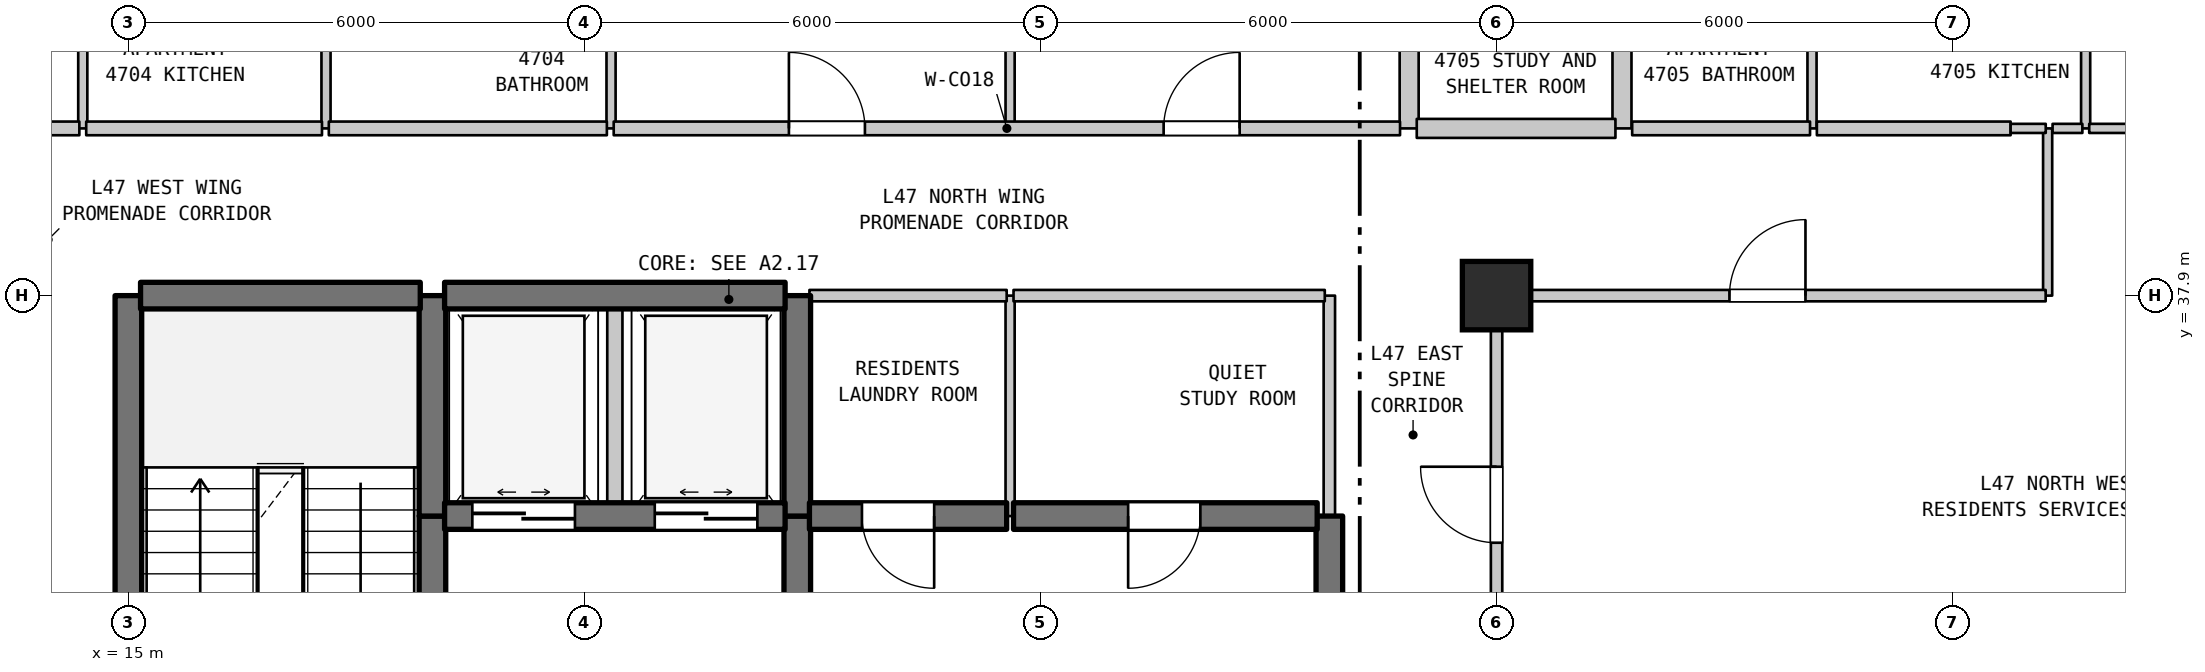
"""IFC4 building model, lengths in metres.
Left out: names, types, materials, properties, quantities, classifications, styles, units other than length and angle.
Written with IfcOpenShell. Run it as: python <this file> out.ifc"""

import sys

from ifc_helpers import new_model, si_unit, direction, frame, frame_2d, origin, origin_2d, place, context, subcontext, project, spatial, rectangle, extrude, element, fill, save


model = new_model("IFC4")
c1 = context("Model", 3, precision=1e-05, world=origin(), true_north=direction((0.0, 1.0)))
c2 = subcontext(c1, "Body", "Model", "MODEL_VIEW")
j1 = project(units=[si_unit("LENGTHUNIT", "METRE"), si_unit("PLANEANGLEUNIT", "RADIAN")], contexts=[c1])
p1 = place(None, origin())
s1 = spatial("IfcSite", under=j1, at=p1, CompositionType="ELEMENT")
p2 = place(p1, origin())
s2 = spatial("IfcBuilding", under=s1, at=p2, CompositionType="ELEMENT")
p3 = place(p2, frame((0.0, 0.0, 192.1)))
s3 = spatial("IfcBuildingStorey", under=s2, at=p3, CompositionType="ELEMENT", Elevation=192.1)
p4 = place(p3, frame((33.0, 37.9, 0.0), z_axis=(0.0, 0.0, 1.0), x_axis=(1.0, 0.0, 0.0)))
e1 = element("IfcColumn", 1, at=p4, inside=s3, PredefinedType="COLUMN", context=c2, shape_type="SweptSolid", body=[
    extrude(rectangle(XDim=0.9, YDim=0.9, at=origin_2d()), origin(), (0.0, 0.0, 1.0), 3.7),
])
p5 = place(p3, frame((14.4, 40.1, 0.0), z_axis=(0.0, 0.0, 1.0), x_axis=(0.0, 1.0, 0.0)))
e2 = element("IfcWall", 2, at=p5, inside=s3, PredefinedType="PARTITIONING", context=c2, shape_type="SweptSolid", body=[
    extrude(rectangle(XDim=2.3, YDim=0.12, at=frame_2d((1.15, 0.0))), origin(), (0.0, 0.0, 1.0), 3.39),
])
p6 = place(p3, frame((15.0, 31.1, 0.0), z_axis=(0.0, 0.0, 1.0), x_axis=(0.0, 1.0, 0.0)))
e3 = element("IfcWall", 3, at=p6, inside=s3, PredefinedType="SHEAR", context=c2, shape_type="SweptSolid", body=[
    extrude(rectangle(XDim=6.8, YDim=0.35, at=frame_2d((3.4, 0.0))), origin(), (0.0, 0.0, 1.0), 3.39),
])
p7 = place(p3, frame((17.6, 40.1, 0.0), z_axis=(0.0, 0.0, 1.0), x_axis=(0.0, 1.0, 0.0)))
e4 = element("IfcWall", 4, at=p7, inside=s3, PredefinedType="PARTITIONING", context=c2, shape_type="SweptSolid", body=[
    extrude(rectangle(XDim=2.3, YDim=0.12, at=frame_2d((1.15, 0.0))), origin(), (0.0, 0.0, 1.0), 3.39),
])
p8 = place(p3, frame((19.0, 29.5, 0.0), z_axis=(0.0, 0.0, 1.0), x_axis=(0.0, 1.0, 0.0)))
e5 = element("IfcWall", 5, at=p8, inside=s3, PredefinedType="SHEAR", context=c2, shape_type="SweptSolid", body=[
    extrude(rectangle(XDim=5.5, YDim=0.35, at=frame_2d((2.75, 0.0))), origin(), (0.0, 0.0, 1.0), 3.39),
])
p9 = place(p8, frame((2.025, 0.0, 0.0)))
e6 = element("IfcOpeningElement", 6, at=p9, cuts=e5, PredefinedType="OPENING", context=c2, shape_type="SweptSolid", body=[
    extrude(rectangle(XDim=1.1, YDim=2.15, at=frame_2d((0.55, 1.075))), frame((0.0, 0.185, 0.0), z_axis=(0.0, -1.0, 0.0), x_axis=(1.0, 0.0, 0.0)), (0.0, 0.0, 1.0), 0.37),
])
p10 = place(p3, frame((19.0, 35.0, 0.0), z_axis=(0.0, 0.0, 1.0), x_axis=(0.0, 1.0, 0.0)))
e7 = element("IfcWall", 7, at=p10, inside=s3, PredefinedType="SHEAR", context=c2, shape_type="SweptSolid", body=[
    extrude(rectangle(XDim=2.9, YDim=0.35, at=frame_2d((1.45, 0.0))), origin(), (0.0, 0.0, 1.0), 3.39),
])
p11 = place(p3, frame((21.35, 40.1, 0.0), z_axis=(0.0, 0.0, 1.0), x_axis=(0.0, 1.0, 0.0)))
e8 = element("IfcWall", 8, at=p11, inside=s3, PredefinedType="PARTITIONING", context=c2, shape_type="SweptSolid", body=[
    extrude(rectangle(XDim=2.3, YDim=0.12, at=frame_2d((1.15, 0.0))), origin(), (0.0, 0.0, 1.0), 3.39),
])
p12 = place(p3, frame((21.4, 35.0, 0.0), z_axis=(0.0, 0.0, 1.0), x_axis=(0.0, 1.0, 0.0)))
e9 = element("IfcWall", 9, at=p12, inside=s3, PredefinedType="STANDARD", context=c2, shape_type="SweptSolid", body=[
    extrude(rectangle(XDim=2.9, YDim=0.2, at=frame_2d((1.45, 0.0))), origin(), (0.0, 0.0, 1.0), 3.39),
])
p13 = place(p3, frame((23.8, 31.5, 0.0), z_axis=(0.0, 0.0, 1.0), x_axis=(0.0, 1.0, 0.0)))
e10 = element("IfcWall", 10, at=p13, inside=s3, PredefinedType="SHEAR", context=c2, shape_type="SweptSolid", body=[
    extrude(rectangle(XDim=3.5, YDim=0.35, at=frame_2d((1.75, 0.0))), origin(), (0.0, 0.0, 1.0), 3.39),
])
p14 = place(p13, frame((1.127, 0.0, 0.0)))
e11 = element("IfcOpeningElement", 11, at=p14, cuts=e10, PredefinedType="OPENING", context=c2, shape_type="SweptSolid", body=[
    extrude(rectangle(XDim=1.1, YDim=2.15, at=frame_2d((0.55, 1.075))), frame((0.0, 0.185, 0.0), z_axis=(0.0, -1.0, 0.0), x_axis=(1.0, 0.0, 0.0)), (0.0, 0.0, 1.0), 0.37),
])
p15 = place(p3, frame((23.8, 35.0, 0.0), z_axis=(0.0, 0.0, 1.0), x_axis=(0.0, 1.0, 0.0)))
e12 = element("IfcWall", 12, at=p15, inside=s3, PredefinedType="SHEAR", context=c2, shape_type="SweptSolid", body=[
    extrude(rectangle(XDim=2.9, YDim=0.35, at=frame_2d((1.45, 0.0))), origin(), (0.0, 0.0, 1.0), 3.39),
])
p16 = place(p3, frame((26.6, 35.0, 0.0), z_axis=(0.0, 0.0, 1.0), x_axis=(0.0, 1.0, 0.0)))
e13 = element("IfcWall", 13, at=p16, inside=s3, PredefinedType="PARTITIONING", context=c2, shape_type="SweptSolid", body=[
    extrude(rectangle(XDim=2.9, YDim=0.12, at=frame_2d((1.45, 0.0))), origin(), (0.0, 0.0, 1.0), 3.39),
])
p17 = place(p3, frame((26.6, 40.1, 0.0), z_axis=(0.0, 0.0, 1.0), x_axis=(0.0, 1.0, 0.0)))
e14 = element("IfcWall", 14, at=p17, inside=s3, PredefinedType="PARTITIONING", context=c2, shape_type="SweptSolid", body=[
    extrude(rectangle(XDim=2.05, YDim=0.12, at=frame_2d((1.025, 0.0))), origin(), (0.0, 0.0, 1.0), 3.39),
])
p18 = place(p3, frame((30.8, 31.5, 0.0), z_axis=(0.0, 0.0, 1.0), x_axis=(0.0, 1.0, 0.0)))
e15 = element("IfcWall", 15, at=p18, inside=s3, PredefinedType="SHEAR", context=c2, shape_type="SweptSolid", body=[
    extrude(rectangle(XDim=3.5, YDim=0.35, at=frame_2d((1.75, 0.0))), origin(), (0.0, 0.0, 1.0), 3.39),
])
p19 = place(p18, frame((1.15, 0.0, 0.0)))
e16 = element("IfcOpeningElement", 16, at=p19, cuts=e15, PredefinedType="OPENING", context=c2, shape_type="SweptSolid", body=[
    extrude(rectangle(XDim=1.2, YDim=2.2, at=frame_2d((0.6, 1.1))), frame((0.0, 0.185, 0.0), z_axis=(0.0, -1.0, 0.0), x_axis=(1.0, 0.0, 0.0)), (0.0, 0.0, 1.0), 0.37),
])
p20 = place(p3, frame((30.8, 35.0, 0.0), z_axis=(0.0, 0.0, 1.0), x_axis=(0.0, 1.0, 0.0)))
e17 = element("IfcWall", 17, at=p20, inside=s3, PredefinedType="STANDARD", context=c2, shape_type="SweptSolid", body=[
    extrude(rectangle(XDim=2.9, YDim=0.15, at=frame_2d((1.45, 0.0))), origin(), (0.0, 0.0, 1.0), 3.39),
])
p21 = place(p3, frame((31.85, 40.1, 0.0), z_axis=(0.0, 0.0, 1.0), x_axis=(0.0, 1.0, 0.0)))
e18 = element("IfcWall", 18, at=p21, inside=s3, PredefinedType="STANDARD", context=c2, shape_type="SweptSolid", body=[
    extrude(rectangle(XDim=2.3, YDim=0.25, at=frame_2d((1.15, 0.0))), origin(), (0.0, 0.0, 1.0), 3.39),
])
p22 = place(p3, frame((33.0, 32.54, 0.0), z_axis=(0.0, 0.0, 1.0), x_axis=(0.0, 1.0, 0.0)))
e19 = element("IfcWall", 19, at=p22, inside=s3, PredefinedType="STANDARD", context=c2, shape_type="SweptSolid", body=[
    extrude(rectangle(XDim=5.36, YDim=0.15, at=frame_2d((2.68, 0.0))), origin(), (0.0, 0.0, 1.0), 2.89),
])
p23 = place(p22, frame((2.109, 0.0, 0.0)))
e20 = element("IfcOpeningElement", 20, at=p23, cuts=e19, PredefinedType="OPENING", context=c2, shape_type="SweptSolid", body=[
    extrude(rectangle(XDim=1.0, YDim=2.15, at=frame_2d((0.5, 1.075))), frame((0.0, 0.085, 0.0), z_axis=(0.0, -1.0, 0.0), x_axis=(1.0, 0.0, 0.0)), (0.0, 0.0, 1.0), 0.17),
])
p24 = place(p3, frame((34.65, 40.1, 0.0), z_axis=(0.0, 0.0, 1.0), x_axis=(0.0, 1.0, 0.0)))
e21 = element("IfcWall", 21, at=p24, inside=s3, PredefinedType="STANDARD", context=c2, shape_type="SweptSolid", body=[
    extrude(rectangle(XDim=2.3, YDim=0.25, at=frame_2d((1.15, 0.0))), origin(), (0.0, 0.0, 1.0), 3.39),
])
p25 = place(p3, frame((37.15, 40.1, 0.0), z_axis=(0.0, 0.0, 1.0), x_axis=(0.0, 1.0, 0.0)))
e22 = element("IfcWall", 22, at=p25, inside=s3, PredefinedType="PARTITIONING", context=c2, shape_type="SweptSolid", body=[
    extrude(rectangle(XDim=2.3, YDim=0.12, at=frame_2d((1.15, 0.0))), origin(), (0.0, 0.0, 1.0), 3.39),
])
p26 = place(p3, frame((40.25, 37.9, 0.0), z_axis=(0.0, 0.0, 1.0), x_axis=(0.0, 1.0, 0.0)))
e23 = element("IfcWall", 23, at=p26, inside=s3, PredefinedType="PARTITIONING", context=c2, shape_type="SweptSolid", body=[
    extrude(rectangle(XDim=2.2, YDim=0.12, at=frame_2d((1.1, 0.0))), origin(), (0.0, 0.0, 1.0), 3.39),
])
p27 = place(p3, frame((40.75, 40.1, 0.0), z_axis=(0.0, 0.0, 1.0), x_axis=(0.0, 1.0, 0.0)))
e24 = element("IfcWall", 24, at=p27, inside=s3, PredefinedType="PARTITIONING", context=c2, shape_type="SweptSolid", body=[
    extrude(rectangle(XDim=2.3, YDim=0.12, at=frame_2d((1.15, 0.0))), origin(), (0.0, 0.0, 1.0), 3.39),
])
p28 = place(p3, frame((19.16, 35.0, 0.0), z_axis=(0.0, 0.0, 1.0), x_axis=(1.0, 0.0, 0.0)))
e25 = element("IfcWall", 25, at=p28, inside=s3, PredefinedType="SHEAR", context=c2, shape_type="SweptSolid", body=[
    extrude(rectangle(XDim=4.48, YDim=0.35, at=frame_2d((2.24, 0.0))), origin(), (0.0, 0.0, 1.0), 3.39),
])
p29 = place(p28, frame((0.365, 0.0, 0.0)))
e26 = element("IfcOpeningElement", 26, at=p29, cuts=e25, PredefinedType="OPENING", context=c2, shape_type="SweptSolid", body=[
    extrude(rectangle(XDim=1.35, YDim=2.2, at=frame_2d((0.675, 1.1))), frame((0.0, 0.185, 0.0), z_axis=(0.0, -1.0, 0.0), x_axis=(1.0, 0.0, 0.0)), (0.0, 0.0, 1.0), 0.37),
])
p30 = place(p28, frame((2.765, 0.0, 0.0)))
e27 = element("IfcOpeningElement", 27, at=p30, cuts=e25, PredefinedType="OPENING", context=c2, shape_type="SweptSolid", body=[
    extrude(rectangle(XDim=1.35, YDim=2.2, at=frame_2d((0.675, 1.1))), frame((0.0, 0.185, 0.0), z_axis=(0.0, -1.0, 0.0), x_axis=(1.0, 0.0, 0.0)), (0.0, 0.0, 1.0), 0.37),
])
p31 = place(p3, frame((23.96, 35.0, 0.0), z_axis=(0.0, 0.0, 1.0), x_axis=(1.0, 0.0, 0.0)))
e28 = element("IfcWall", 28, at=p31, inside=s3, PredefinedType="SHEAR", context=c2, shape_type="SweptSolid", body=[
    extrude(rectangle(XDim=2.595, YDim=0.35, at=frame_2d((1.297, 0.0))), origin(), (0.0, 0.0, 1.0), 3.39),
])
p32 = place(p31, frame((0.691, 0.0, 0.0)))
e29 = element("IfcOpeningElement", 29, at=p32, cuts=e28, PredefinedType="OPENING", context=c2, shape_type="SweptSolid", body=[
    extrude(rectangle(XDim=0.95, YDim=2.15, at=frame_2d((0.475, 1.075))), frame((0.0, 0.185, 0.0), z_axis=(0.0, -1.0, 0.0), x_axis=(1.0, 0.0, 0.0)), (0.0, 0.0, 1.0), 0.37),
])
p33 = place(p3, frame((26.645, 35.0, 0.0), z_axis=(0.0, 0.0, 1.0), x_axis=(1.0, 0.0, 0.0)))
e30 = element("IfcWall", 30, at=p33, inside=s3, PredefinedType="SHEAR", context=c2, shape_type="SweptSolid", body=[
    extrude(rectangle(XDim=3.995, YDim=0.35, at=frame_2d((1.998, 0.0))), origin(), (0.0, 0.0, 1.0), 3.39),
])
p34 = place(p33, frame((1.508, 0.0, 0.0)))
e31 = element("IfcOpeningElement", 31, at=p34, cuts=e30, PredefinedType="OPENING", context=c2, shape_type="SweptSolid", body=[
    extrude(rectangle(XDim=0.95, YDim=2.15, at=frame_2d((0.475, 1.075))), frame((0.0, 0.185, 0.0), z_axis=(0.0, -1.0, 0.0), x_axis=(1.0, 0.0, 0.0)), (0.0, 0.0, 1.0), 0.37),
])
p35 = place(p3, frame((15.16, 37.9, 0.0), z_axis=(0.0, 0.0, 1.0), x_axis=(1.0, 0.0, 0.0)))
e32 = element("IfcWall", 32, at=p35, inside=s3, PredefinedType="SHEAR", context=c2, shape_type="SweptSolid", body=[
    extrude(rectangle(XDim=3.68, YDim=0.35, at=frame_2d((1.84, 0.0))), origin(), (0.0, 0.0, 1.0), 3.39),
])
p36 = place(p3, frame((19.16, 37.9, 0.0), z_axis=(0.0, 0.0, 1.0), x_axis=(1.0, 0.0, 0.0)))
e33 = element("IfcWall", 33, at=p36, inside=s3, PredefinedType="SHEAR", context=c2, shape_type="SweptSolid", body=[
    extrude(rectangle(XDim=4.48, YDim=0.35, at=frame_2d((2.24, 0.0))), origin(), (0.0, 0.0, 1.0), 3.39),
])
p37 = place(p3, frame((23.96, 37.9, 0.0), z_axis=(0.0, 0.0, 1.0), x_axis=(1.0, 0.0, 0.0)))
e34 = element("IfcWall", 34, at=p37, inside=s3, PredefinedType="STANDARD", context=c2, shape_type="SweptSolid", body=[
    extrude(rectangle(XDim=2.595, YDim=0.15, at=frame_2d((1.297, 0.0))), origin(), (0.0, 0.0, 1.0), 2.89),
])
p38 = place(p3, frame((26.645, 37.9, 0.0), z_axis=(0.0, 0.0, 1.0), x_axis=(1.0, 0.0, 0.0)))
e35 = element("IfcWall", 35, at=p38, inside=s3, PredefinedType="STANDARD", context=c2, shape_type="SweptSolid", body=[
    extrude(rectangle(XDim=4.095, YDim=0.15, at=frame_2d((2.047, 0.0))), origin(), (0.0, 0.0, 1.0), 2.89),
])
p39 = place(p3, frame((33.06, 37.9, 0.0), z_axis=(0.0, 0.0, 1.0), x_axis=(1.0, 0.0, 0.0)))
e36 = element("IfcWall", 36, at=p39, inside=s3, PredefinedType="STANDARD", context=c2, shape_type="SweptSolid", body=[
    extrude(rectangle(XDim=7.164, YDim=0.15, at=frame_2d((3.582, 0.0))), origin(), (0.0, 0.0, 1.0), 3.39),
])
p40 = place(p39, frame((3.004, 0.0, 0.0)))
e37 = element("IfcOpeningElement", 37, at=p40, cuts=e36, PredefinedType="OPENING", context=c2, shape_type="SweptSolid", body=[
    extrude(rectangle(XDim=1.0, YDim=2.15, at=frame_2d((0.5, 1.075))), frame((0.0, 0.085, 0.0), z_axis=(0.0, -1.0, 0.0), x_axis=(1.0, 0.0, 0.0)), (0.0, 0.0, 1.0), 0.17),
])
p41 = place(p3, frame((12.875, 40.1, 0.0), z_axis=(0.0, 0.0, 1.0), x_axis=(1.0, 0.0, 0.0)))
e38 = element("IfcWall", 38, at=p41, inside=s3, PredefinedType="STANDARD", context=c2, shape_type="SweptSolid", body=[
    extrude(rectangle(XDim=1.48, YDim=0.18, at=frame_2d((0.74, 0.0))), origin(), (0.0, 0.0, 1.0), 3.39),
])
p42 = place(p3, frame((14.445, 40.1, 0.0), z_axis=(0.0, 0.0, 1.0), x_axis=(1.0, 0.0, 0.0)))
e39 = element("IfcWall", 39, at=p42, inside=s3, PredefinedType="STANDARD", context=c2, shape_type="SweptSolid", body=[
    extrude(rectangle(XDim=3.102, YDim=0.18, at=frame_2d((1.551, 0.0))), origin(), (0.0, 0.0, 1.0), 3.39),
])
p43 = place(p3, frame((17.637, 40.1, 0.0), z_axis=(0.0, 0.0, 1.0), x_axis=(1.0, 0.0, 0.0)))
e40 = element("IfcWall", 40, at=p43, inside=s3, PredefinedType="STANDARD", context=c2, shape_type="SweptSolid", body=[
    extrude(rectangle(XDim=3.658, YDim=0.18, at=frame_2d((1.829, 0.0))), origin(), (0.0, 0.0, 1.0), 3.39),
])
p44 = place(p3, frame((21.385, 40.1, 0.0), z_axis=(0.0, 0.0, 1.0), x_axis=(1.0, 0.0, 0.0)))
e41 = element("IfcWall", 41, at=p44, inside=s3, PredefinedType="STANDARD", context=c2, shape_type="SweptSolid", body=[
    extrude(rectangle(XDim=10.345, YDim=0.18, at=frame_2d((5.172, 0.0))), origin(), (0.0, 0.0, 1.0), 3.39),
])
p45 = place(p44, frame((2.305, 0.0, 0.0)))
e42 = element("IfcOpeningElement", 42, at=p45, cuts=e41, PredefinedType="OPENING", context=c2, shape_type="SweptSolid", body=[
    extrude(rectangle(XDim=1.0, YDim=2.15, at=frame_2d((0.5, 1.075))), frame((0.0, 0.1, 0.0), z_axis=(0.0, -1.0, 0.0), x_axis=(1.0, 0.0, 0.0)), (0.0, 0.0, 1.0), 0.2),
])
p46 = place(p44, frame((7.235, 0.0, 0.0)))
e43 = element("IfcOpeningElement", 43, at=p46, cuts=e41, PredefinedType="OPENING", context=c2, shape_type="SweptSolid", body=[
    extrude(rectangle(XDim=1.0, YDim=2.15, at=frame_2d((0.5, 1.075))), frame((0.0, 0.1, 0.0), z_axis=(0.0, -1.0, 0.0), x_axis=(1.0, 0.0, 0.0)), (0.0, 0.0, 1.0), 0.2),
])
p47 = place(p3, frame((31.95, 40.1, 0.0), z_axis=(0.0, 0.0, 1.0), x_axis=(1.0, 0.0, 0.0)))
e44 = element("IfcWall", 44, at=p47, inside=s3, PredefinedType="STANDARD", context=c2, shape_type="SweptSolid", body=[
    extrude(rectangle(XDim=2.614, YDim=0.25, at=frame_2d((1.307, 0.0))), origin(), (0.0, 0.0, 1.0), 3.39),
])
p48 = place(p3, frame((34.784, 40.1, 0.0), z_axis=(0.0, 0.0, 1.0), x_axis=(1.0, 0.0, 0.0)))
e45 = element("IfcWall", 45, at=p48, inside=s3, PredefinedType="STANDARD", context=c2, shape_type="SweptSolid", body=[
    extrude(rectangle(XDim=2.34, YDim=0.18, at=frame_2d((1.17, 0.0))), origin(), (0.0, 0.0, 1.0), 3.39),
])
p49 = place(p3, frame((37.214, 40.1, 0.0), z_axis=(0.0, 0.0, 1.0), x_axis=(1.0, 0.0, 0.0)))
e46 = element("IfcWall", 46, at=p49, inside=s3, PredefinedType="STANDARD", context=c2, shape_type="SweptSolid", body=[
    extrude(rectangle(XDim=2.549, YDim=0.18, at=frame_2d((1.274, 0.0))), origin(), (0.0, 0.0, 1.0), 3.39),
])
p50 = place(p3, frame((39.763, 40.1, 0.0), z_axis=(0.0, 0.0, 1.0), x_axis=(1.0, 0.0, 0.0)))
e47 = element("IfcWall", 47, at=p50, inside=s3, PredefinedType="PARTITIONING", context=c2, shape_type="SweptSolid", body=[
    extrude(rectangle(XDim=0.462, YDim=0.12, at=frame_2d((0.231, 0.0))), origin(), (0.0, 0.0, 1.0), 3.39),
])
p51 = place(p3, frame((40.315, 40.1, 0.0), z_axis=(0.0, 0.0, 1.0), x_axis=(1.0, 0.0, 0.0)))
e48 = element("IfcWall", 48, at=p51, inside=s3, PredefinedType="PARTITIONING", context=c2, shape_type="SweptSolid", body=[
    extrude(rectangle(XDim=0.392, YDim=0.12, at=frame_2d((0.196, 0.0))), origin(), (0.0, 0.0, 1.0), 3.39),
])
p52 = place(p3, frame((40.797, 40.1, 0.0), z_axis=(0.0, 0.0, 1.0), x_axis=(1.0, 0.0, 0.0)))
e49 = element("IfcWall", 49, at=p52, inside=s3, PredefinedType="PARTITIONING", context=c2, shape_type="SweptSolid", body=[
    extrude(rectangle(XDim=1.378, YDim=0.12, at=frame_2d((0.689, 0.0))), origin(), (0.0, 0.0, 1.0), 3.39),
])
p53 = place(p23, origin())
e50 = element("IfcDoor", 50, at=p53, inside=s3, OperationType="SINGLE_SWING_RIGHT", PredefinedType="DOOR", context=c2, shape_type="SweptSolid", body=[
    extrude(rectangle(XDim=1.0, YDim=2.15, at=frame_2d((0.5, 1.075))), frame((0.0, 0.025, 0.0), z_axis=(0.0, -1.0, 0.0), x_axis=(1.0, 0.0, 0.0)), (0.0, 0.0, 1.0), 0.05),
])
fill(e20, e50)
p54 = place(p29, origin())
e51 = element("IfcDoor", 51, at=p54, inside=s3, OperationType="DOUBLE_DOOR_SLIDING", PredefinedType="DOOR", context=c2, shape_type="SweptSolid", body=[
    extrude(rectangle(XDim=1.35, YDim=2.2, at=frame_2d((0.675, 1.1))), frame((0.0, 0.025, 0.0), z_axis=(0.0, -1.0, 0.0), x_axis=(1.0, 0.0, 0.0)), (0.0, 0.0, 1.0), 0.05),
])
fill(e26, e51)
p55 = place(p30, origin())
e52 = element("IfcDoor", 52, at=p55, inside=s3, OperationType="DOUBLE_DOOR_SLIDING", PredefinedType="DOOR", context=c2, shape_type="SweptSolid", body=[
    extrude(rectangle(XDim=1.35, YDim=2.2, at=frame_2d((0.675, 1.1))), frame((0.0, 0.025, 0.0), z_axis=(0.0, -1.0, 0.0), x_axis=(1.0, 0.0, 0.0)), (0.0, 0.0, 1.0), 0.05),
])
fill(e27, e52)
p56 = place(p32, frame((0.95, 0.0, 0.0), z_axis=(0.0, 0.0, 1.0), x_axis=(-1.0, 0.0, 0.0)))
e53 = element("IfcDoor", 53, at=p56, inside=s3, OperationType="SINGLE_SWING_RIGHT", PredefinedType="DOOR", context=c2, shape_type="SweptSolid", body=[
    extrude(rectangle(XDim=0.95, YDim=2.15, at=frame_2d((0.475, 1.075))), frame((0.0, 0.025, 0.0), z_axis=(0.0, -1.0, 0.0), x_axis=(1.0, 0.0, 0.0)), (0.0, 0.0, 1.0), 0.05),
])
fill(e29, e53)
p57 = place(p34, frame((0.95, 0.0, 0.0), z_axis=(0.0, 0.0, 1.0), x_axis=(-1.0, 0.0, 0.0)))
e54 = element("IfcDoor", 54, at=p57, inside=s3, OperationType="SINGLE_SWING_LEFT", PredefinedType="DOOR", context=c2, shape_type="SweptSolid", body=[
    extrude(rectangle(XDim=0.95, YDim=2.15, at=frame_2d((0.475, 1.075))), frame((0.0, 0.025, 0.0), z_axis=(0.0, -1.0, 0.0), x_axis=(1.0, 0.0, 0.0)), (0.0, 0.0, 1.0), 0.05),
])
fill(e31, e54)
p58 = place(p40, origin())
e55 = element("IfcDoor", 55, at=p58, inside=s3, OperationType="SINGLE_SWING_RIGHT", PredefinedType="DOOR", context=c2, shape_type="SweptSolid", body=[
    extrude(rectangle(XDim=1.0, YDim=2.15, at=frame_2d((0.5, 1.075))), frame((0.0, 0.025, 0.0), z_axis=(0.0, -1.0, 0.0), x_axis=(1.0, 0.0, 0.0)), (0.0, 0.0, 1.0), 0.05),
])
fill(e37, e55)
p59 = place(p45, origin())
e56 = element("IfcDoor", 56, at=p59, inside=s3, OperationType="SINGLE_SWING_LEFT", PredefinedType="DOOR", context=c2, shape_type="SweptSolid", body=[
    extrude(rectangle(XDim=1.0, YDim=2.15, at=frame_2d((0.5, 1.075))), frame((0.0, 0.025, 0.0), z_axis=(0.0, -1.0, 0.0), x_axis=(1.0, 0.0, 0.0)), (0.0, 0.0, 1.0), 0.05),
])
fill(e42, e56)
p60 = place(p46, origin())
e57 = element("IfcDoor", 57, at=p60, inside=s3, OperationType="SINGLE_SWING_RIGHT", PredefinedType="DOOR", context=c2, shape_type="SweptSolid", body=[
    extrude(rectangle(XDim=1.0, YDim=2.15, at=frame_2d((0.5, 1.075))), frame((0.0, 0.025, 0.0), z_axis=(0.0, -1.0, 0.0), x_axis=(1.0, 0.0, 0.0)), (0.0, 0.0, 1.0), 0.05),
])
fill(e43, e57)
save(model, sys.argv[1])
